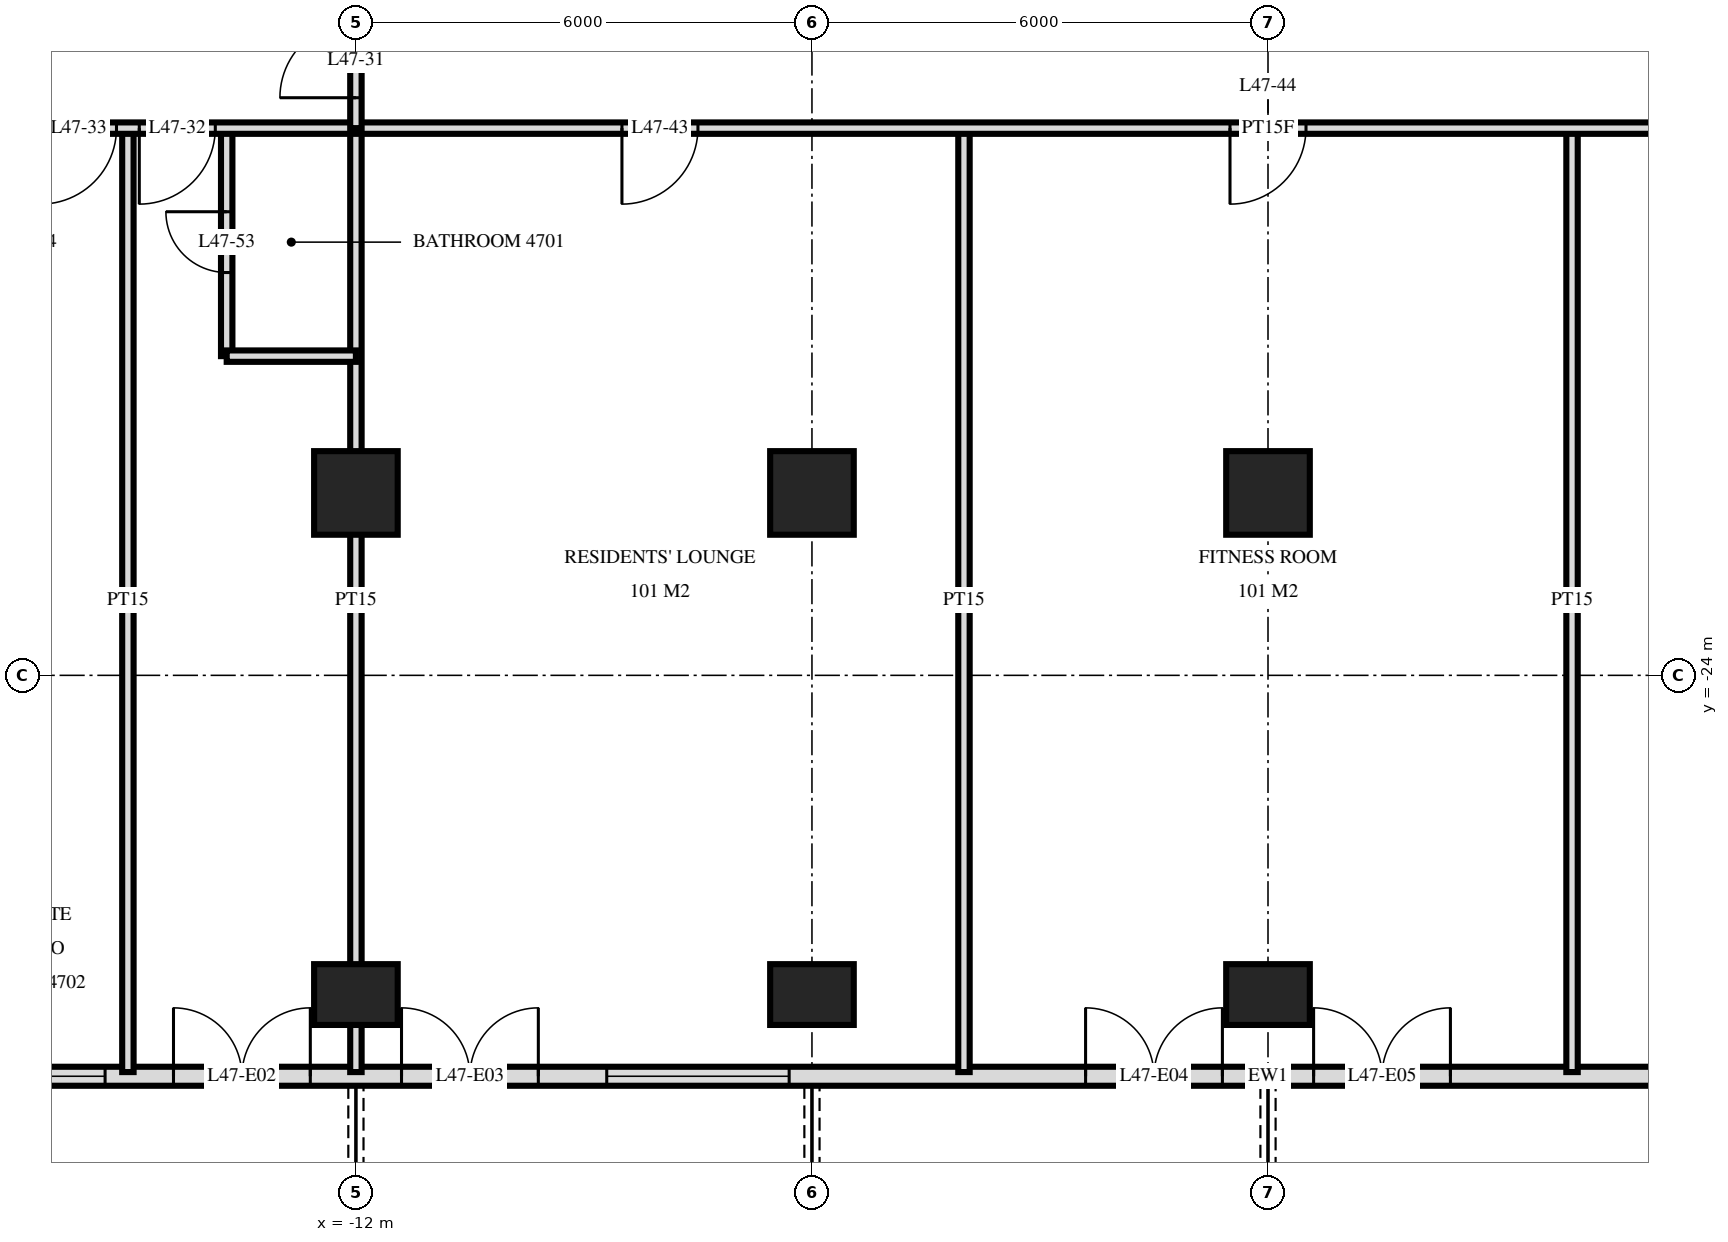
"""IFC4 building model, lengths in metres.
Left out: names, types, materials, properties, quantities, classifications, styles, units other than length and angle.
Written with IfcOpenShell. Run it as: python <this file> out.ifc"""

import sys

from ifc_helpers import new_model, si_unit, direction, frame, frame_2d, origin, origin_2d, place, context, subcontext, project, spatial, rectangle, extrude, element, fill, save


model = new_model("IFC4")
c1 = context("Model", 3, precision=1e-05, world=origin(), true_north=direction((0.0, 1.0)))
c2 = subcontext(c1, "Body", "Model", "MODEL_VIEW")
j1 = project(units=[si_unit("LENGTHUNIT", "METRE"), si_unit("PLANEANGLEUNIT", "RADIAN")], contexts=[c1])
p1 = place(None, origin())
s1 = spatial("IfcSite", under=j1, at=p1, CompositionType="ELEMENT")
p2 = place(p1, origin())
s2 = spatial("IfcBuilding", under=s1, at=p2, CompositionType="ELEMENT")
p3 = place(p2, frame((0.0, 0.0, 183.6)))
s3 = spatial("IfcBuildingStorey", under=s2, at=p3, CompositionType="ELEMENT", Elevation=183.6)
p4 = place(p3, frame((-12.0, -28.2, -0.28), z_axis=(0.0, 0.0, 1.0), x_axis=(1.0, 0.0, 0.0)))
e1 = element("IfcColumn", 1, at=p4, inside=s3, PredefinedType="COLUMN", context=c2, shape_type="SweptSolid", body=[
    extrude(rectangle(XDim=1.1, YDim=0.8, at=origin_2d()), origin(), (0.0, 0.0, 1.0), 3.78),
])
p5 = place(p3, frame((-12.0, -21.6, -0.28), z_axis=(0.0, 0.0, 1.0), x_axis=(1.0, 0.0, 0.0)))
e2 = element("IfcColumn", 2, at=p5, inside=s3, PredefinedType="COLUMN", context=c2, shape_type="SweptSolid", body=[
    extrude(rectangle(XDim=1.1, YDim=1.1, at=origin_2d()), origin(), (0.0, 0.0, 1.0), 3.78),
])
p6 = place(p3, frame((-6.0, -28.2, -0.28), z_axis=(0.0, 0.0, 1.0), x_axis=(1.0, 0.0, 0.0)))
e3 = element("IfcColumn", 3, at=p6, inside=s3, PredefinedType="COLUMN", context=c2, shape_type="SweptSolid", body=[
    extrude(rectangle(XDim=1.1, YDim=0.8, at=origin_2d()), origin(), (0.0, 0.0, 1.0), 3.78),
])
p7 = place(p3, frame((-6.0, -21.6, -0.28), z_axis=(0.0, 0.0, 1.0), x_axis=(1.0, 0.0, 0.0)))
e4 = element("IfcColumn", 4, at=p7, inside=s3, PredefinedType="COLUMN", context=c2, shape_type="SweptSolid", body=[
    extrude(rectangle(XDim=1.1, YDim=1.1, at=origin_2d()), origin(), (0.0, 0.0, 1.0), 3.78),
])
p8 = place(p3, frame((0.0, -28.2, -0.28), z_axis=(0.0, 0.0, 1.0), x_axis=(1.0, 0.0, 0.0)))
e5 = element("IfcColumn", 5, at=p8, inside=s3, PredefinedType="COLUMN", context=c2, shape_type="SweptSolid", body=[
    extrude(rectangle(XDim=1.1, YDim=0.8, at=origin_2d()), origin(), (0.0, 0.0, 1.0), 3.78),
])
p9 = place(p3, frame((0.0, -21.6, -0.28), z_axis=(0.0, 0.0, 1.0), x_axis=(1.0, 0.0, 0.0)))
e6 = element("IfcColumn", 6, at=p9, inside=s3, PredefinedType="COLUMN", context=c2, shape_type="SweptSolid", body=[
    extrude(rectangle(XDim=1.1, YDim=1.1, at=origin_2d()), origin(), (0.0, 0.0, 1.0), 3.78),
])
p10 = place(p3, frame((-22.475, -29.275, 0.0), z_axis=(0.0, 0.0, 1.0), x_axis=(1.0, 0.0, 0.0)))
e7 = element("IfcWall", 7, at=p10, inside=s3, PredefinedType="SOLIDWALL", context=c2, shape_type="SweptSolid", body=[
    extrude(rectangle(XDim=44.951, YDim=0.25, at=frame_2d((22.475, 0.0))), origin(), (0.0, 0.0, 1.0), 3.22),
])
p11 = place(p10, frame((0.575, 0.0, 0.0)))
e8 = element("IfcOpeningElement", 8, at=p11, cuts=e7, PredefinedType="OPENING", context=c2, shape_type="SweptSolid", body=[
    extrude(rectangle(XDim=1.8, YDim=2.4, at=frame_2d((0.9, 1.2))), frame((0.0, 0.135, 0.0), z_axis=(0.0, -1.0, 0.0), x_axis=(1.0, 0.0, 0.0)), (0.0, 0.0, 1.0), 0.27),
])
p12 = place(p10, frame((4.775, 0.0, 0.9)))
e9 = element("IfcOpeningElement", 9, at=p12, cuts=e7, PredefinedType="OPENING", context=c2, shape_type="SweptSolid", body=[
    extrude(rectangle(XDim=2.4, YDim=1.5, at=frame_2d((1.2, 0.75))), frame((0.0, 0.135, 0.0), z_axis=(0.0, -1.0, 0.0), x_axis=(1.0, 0.0, 0.0)), (0.0, 0.0, 1.0), 0.27),
])
p13 = place(p10, frame((8.075, 0.0, 0.0)))
e10 = element("IfcOpeningElement", 10, at=p13, cuts=e7, PredefinedType="OPENING", context=c2, shape_type="SweptSolid", body=[
    extrude(rectangle(XDim=1.8, YDim=2.4, at=frame_2d((0.9, 1.2))), frame((0.0, 0.135, 0.0), z_axis=(0.0, -1.0, 0.0), x_axis=(1.0, 0.0, 0.0)), (0.0, 0.0, 1.0), 0.27),
])
p14 = place(p10, frame((11.075, 0.0, 0.0)))
e11 = element("IfcOpeningElement", 11, at=p14, cuts=e7, PredefinedType="OPENING", context=c2, shape_type="SweptSolid", body=[
    extrude(rectangle(XDim=1.8, YDim=2.4, at=frame_2d((0.9, 1.2))), frame((0.0, 0.135, 0.0), z_axis=(0.0, -1.0, 0.0), x_axis=(1.0, 0.0, 0.0)), (0.0, 0.0, 1.0), 0.27),
])
p15 = place(p10, frame((13.775, 0.0, 0.9)))
e12 = element("IfcOpeningElement", 12, at=p15, cuts=e7, PredefinedType="OPENING", context=c2, shape_type="SweptSolid", body=[
    extrude(rectangle(XDim=2.4, YDim=1.5, at=frame_2d((1.2, 0.75))), frame((0.0, 0.135, 0.0), z_axis=(0.0, -1.0, 0.0), x_axis=(1.0, 0.0, 0.0)), (0.0, 0.0, 1.0), 0.27),
])
p16 = place(p10, frame((20.075, 0.0, 0.0)))
e13 = element("IfcOpeningElement", 13, at=p16, cuts=e7, PredefinedType="OPENING", context=c2, shape_type="SweptSolid", body=[
    extrude(rectangle(XDim=1.8, YDim=2.4, at=frame_2d((0.9, 1.2))), frame((0.0, 0.135, 0.0), z_axis=(0.0, -1.0, 0.0), x_axis=(1.0, 0.0, 0.0)), (0.0, 0.0, 1.0), 0.27),
])
p17 = place(p10, frame((23.075, 0.0, 0.0)))
e14 = element("IfcOpeningElement", 14, at=p17, cuts=e7, PredefinedType="OPENING", context=c2, shape_type="SweptSolid", body=[
    extrude(rectangle(XDim=1.8, YDim=2.4, at=frame_2d((0.9, 1.2))), frame((0.0, 0.135, 0.0), z_axis=(0.0, -1.0, 0.0), x_axis=(1.0, 0.0, 0.0)), (0.0, 0.0, 1.0), 0.27),
])
p18 = place(p10, frame((29.075, 0.0, 0.0)))
e15 = element("IfcOpeningElement", 15, at=p18, cuts=e7, PredefinedType="OPENING", context=c2, shape_type="SweptSolid", body=[
    extrude(rectangle(XDim=1.8, YDim=2.4, at=frame_2d((0.9, 1.2))), frame((0.0, 0.135, 0.0), z_axis=(0.0, -1.0, 0.0), x_axis=(1.0, 0.0, 0.0)), (0.0, 0.0, 1.0), 0.27),
])
p19 = place(p10, frame((31.775, 0.0, 0.9)))
e16 = element("IfcOpeningElement", 16, at=p19, cuts=e7, PredefinedType="OPENING", context=c2, shape_type="SweptSolid", body=[
    extrude(rectangle(XDim=2.4, YDim=1.5, at=frame_2d((1.2, 0.75))), frame((0.0, 0.135, 0.0), z_axis=(0.0, -1.0, 0.0), x_axis=(1.0, 0.0, 0.0)), (0.0, 0.0, 1.0), 0.27),
])
p20 = place(p10, frame((35.075, 0.0, 0.0)))
e17 = element("IfcOpeningElement", 17, at=p20, cuts=e7, PredefinedType="OPENING", context=c2, shape_type="SweptSolid", body=[
    extrude(rectangle(XDim=1.8, YDim=2.4, at=frame_2d((0.9, 1.2))), frame((0.0, 0.135, 0.0), z_axis=(0.0, -1.0, 0.0), x_axis=(1.0, 0.0, 0.0)), (0.0, 0.0, 1.0), 0.27),
])
p21 = place(p10, frame((37.775, 0.0, 0.9)))
e18 = element("IfcOpeningElement", 18, at=p21, cuts=e7, PredefinedType="OPENING", context=c2, shape_type="SweptSolid", body=[
    extrude(rectangle(XDim=2.4, YDim=1.5, at=frame_2d((1.2, 0.75))), frame((0.0, 0.135, 0.0), z_axis=(0.0, -1.0, 0.0), x_axis=(1.0, 0.0, 0.0)), (0.0, 0.0, 1.0), 0.27),
])
p22 = place(p10, frame((41.075, 0.0, 0.0)))
e19 = element("IfcOpeningElement", 19, at=p22, cuts=e7, PredefinedType="OPENING", context=c2, shape_type="SweptSolid", body=[
    extrude(rectangle(XDim=1.8, YDim=2.4, at=frame_2d((0.9, 1.2))), frame((0.0, 0.135, 0.0), z_axis=(0.0, -1.0, 0.0), x_axis=(1.0, 0.0, 0.0)), (0.0, 0.0, 1.0), 0.27),
])
for number, where, z_axis, x_axis in (
    (20, (4.0, -29.22, 0.0), (0.0, 0.0, 1.0), (0.0, 1.0, 0.0)),
    (21, (-4.0, -29.22, 0.0), (0.0, 0.0, 1.0), (0.0, 1.0, 0.0)),
):
    element("IfcWall", number, at=place(p3, frame(where, z_axis=z_axis, x_axis=x_axis)), inside=s3, PredefinedType="PARTITIONING", context=c2, shape_type="SweptSolid", body=[
        extrude(rectangle(XDim=12.42, YDim=0.15, at=frame_2d((6.21, 0.0))), origin(), (0.0, 0.0, 1.0), 3.22),
    ])
p23 = place(p3, frame((-12.0, -16.8, 0.0), z_axis=(0.0, 0.0, 1.0), x_axis=(0.0, 1.0, 0.0)))
e22 = element("IfcWall", 22, at=p23, inside=s3, PredefinedType="PARTITIONING", context=c2, shape_type="SweptSolid", body=[
    extrude(rectangle(XDim=1.75, YDim=0.15, at=frame_2d((0.875, 0.0))), origin(), (0.0, 0.0, 1.0), 3.22),
])
p24 = place(p23, frame((0.4, 0.0, 0.0)))
e23 = element("IfcOpeningElement", 23, at=p24, cuts=e22, PredefinedType="OPENING", context=c2, shape_type="SweptSolid", body=[
    extrude(rectangle(XDim=1.0, YDim=2.1, at=frame_2d((0.5, 1.05))), frame((0.0, 0.085, 0.0), z_axis=(0.0, -1.0, 0.0), x_axis=(1.0, 0.0, 0.0)), (0.0, 0.0, 1.0), 0.17),
])
p25 = place(p3, frame((-12.0, -29.22, 0.0), z_axis=(0.0, 0.0, 1.0), x_axis=(0.0, 1.0, 0.0)))
e24 = element("IfcWall", 24, at=p25, inside=s3, PredefinedType="PARTITIONING", context=c2, shape_type="SweptSolid", body=[
    extrude(rectangle(XDim=12.42, YDim=0.15, at=frame_2d((6.21, 0.0))), origin(), (0.0, 0.0, 1.0), 3.22),
])
p26 = place(p3, frame((-13.7, -19.8, 0.0), z_axis=(0.0, 0.0, 1.0), x_axis=(0.0, 1.0, 0.0)))
e25 = element("IfcWall", 25, at=p26, inside=s3, PredefinedType="PARTITIONING", context=c2, shape_type="SweptSolid", body=[
    extrude(rectangle(XDim=3.0, YDim=0.15, at=frame_2d((1.5, 0.0))), origin(), (0.0, 0.0, 1.0), 3.22),
])
p27 = place(p26, frame((1.1, 0.0, 0.0)))
e26 = element("IfcOpeningElement", 26, at=p27, cuts=e25, PredefinedType="OPENING", context=c2, shape_type="SweptSolid", body=[
    extrude(rectangle(XDim=0.8, YDim=2.1, at=frame_2d((0.4, 1.05))), frame((0.0, 0.085, 0.0), z_axis=(0.0, -1.0, 0.0), x_axis=(1.0, 0.0, 0.0)), (0.0, 0.0, 1.0), 0.17),
])
p28 = place(p3, frame((-15.0, -29.22, 0.0), z_axis=(0.0, 0.0, 1.0), x_axis=(0.0, 1.0, 0.0)))
e27 = element("IfcWall", 27, at=p28, inside=s3, PredefinedType="PARTITIONING", context=c2, shape_type="SweptSolid", body=[
    extrude(rectangle(XDim=12.42, YDim=0.15, at=frame_2d((6.21, 0.0))), origin(), (0.0, 0.0, 1.0), 3.22),
])
p29 = place(p3, frame((-13.7, -19.8, 0.0), z_axis=(0.0, 0.0, 1.0), x_axis=(1.0, 0.0, 0.0)))
e28 = element("IfcWall", 28, at=p29, inside=s3, PredefinedType="PARTITIONING", context=c2, shape_type="SweptSolid", body=[
    extrude(rectangle(XDim=1.7, YDim=0.15, at=frame_2d((0.85, 0.0))), origin(), (0.0, 0.0, 1.0), 3.22),
])
p30 = place(p3, frame((-26.82, -16.8, 0.0), z_axis=(0.0, 0.0, 1.0), x_axis=(1.0, 0.0, 0.0)))
e29 = element("IfcWall", 29, at=p30, inside=s3, PredefinedType="PARTITIONING", context=c2, shape_type="SweptSolid", body=[
    extrude(rectangle(XDim=53.64, YDim=0.15, at=frame_2d((26.82, 0.0))), origin(), (0.0, 0.0, 1.0), 3.22),
])
p31 = place(p30, frame((11.97, 0.0, 0.0)))
e30 = element("IfcOpeningElement", 30, at=p31, cuts=e29, PredefinedType="OPENING", context=c2, shape_type="SweptSolid", body=[
    extrude(rectangle(XDim=1.0, YDim=2.1, at=frame_2d((0.5, 1.05))), frame((0.0, 0.085, 0.0), z_axis=(0.0, -1.0, 0.0), x_axis=(1.0, 0.0, 0.0)), (0.0, 0.0, 1.0), 0.17),
])
p32 = place(p30, frame((10.67, 0.0, 0.0)))
e31 = element("IfcOpeningElement", 31, at=p32, cuts=e29, PredefinedType="OPENING", context=c2, shape_type="SweptSolid", body=[
    extrude(rectangle(XDim=1.0, YDim=2.1, at=frame_2d((0.5, 1.05))), frame((0.0, 0.085, 0.0), z_axis=(0.0, -1.0, 0.0), x_axis=(1.0, 0.0, 0.0)), (0.0, 0.0, 1.0), 0.17),
])
p33 = place(p30, frame((3.22, 0.0, 0.0)))
e32 = element("IfcOpeningElement", 32, at=p33, cuts=e29, PredefinedType="OPENING", context=c2, shape_type="SweptSolid", body=[
    extrude(rectangle(XDim=1.0, YDim=2.1, at=frame_2d((0.5, 1.05))), frame((0.0, 0.085, 0.0), z_axis=(0.0, -1.0, 0.0), x_axis=(1.0, 0.0, 0.0)), (0.0, 0.0, 1.0), 0.17),
])
p34 = place(p30, frame((5.02, 0.0, 0.0)))
e33 = element("IfcOpeningElement", 33, at=p34, cuts=e29, PredefinedType="OPENING", context=c2, shape_type="SweptSolid", body=[
    extrude(rectangle(XDim=1.0, YDim=2.1, at=frame_2d((0.5, 1.05))), frame((0.0, 0.085, 0.0), z_axis=(0.0, -1.0, 0.0), x_axis=(1.0, 0.0, 0.0)), (0.0, 0.0, 1.0), 0.17),
])
p35 = place(p30, frame((38.97, 0.0, 0.0)))
e34 = element("IfcOpeningElement", 34, at=p35, cuts=e29, PredefinedType="OPENING", context=c2, shape_type="SweptSolid", body=[
    extrude(rectangle(XDim=1.0, YDim=2.1, at=frame_2d((0.5, 1.05))), frame((0.0, 0.085, 0.0), z_axis=(0.0, -1.0, 0.0), x_axis=(1.0, 0.0, 0.0)), (0.0, 0.0, 1.0), 0.17),
])
p36 = place(p30, frame((48.72, 0.0, 0.0)))
e35 = element("IfcOpeningElement", 35, at=p36, cuts=e29, PredefinedType="OPENING", context=c2, shape_type="SweptSolid", body=[
    extrude(rectangle(XDim=1.0, YDim=2.1, at=frame_2d((0.5, 1.05))), frame((0.0, 0.085, 0.0), z_axis=(0.0, -1.0, 0.0), x_axis=(1.0, 0.0, 0.0)), (0.0, 0.0, 1.0), 0.17),
])
p37 = place(p30, frame((46.92, 0.0, 0.0)))
e36 = element("IfcOpeningElement", 36, at=p37, cuts=e29, PredefinedType="OPENING", context=c2, shape_type="SweptSolid", body=[
    extrude(rectangle(XDim=1.0, YDim=2.1, at=frame_2d((0.5, 1.05))), frame((0.0, 0.085, 0.0), z_axis=(0.0, -1.0, 0.0), x_axis=(1.0, 0.0, 0.0)), (0.0, 0.0, 1.0), 0.17),
])
p38 = place(p30, frame((18.32, 0.0, 0.0)))
e37 = element("IfcOpeningElement", 37, at=p38, cuts=e29, PredefinedType="OPENING", context=c2, shape_type="SweptSolid", body=[
    extrude(rectangle(XDim=1.0, YDim=2.1, at=frame_2d((0.5, 1.05))), frame((0.0, 0.085, 0.0), z_axis=(0.0, -1.0, 0.0), x_axis=(1.0, 0.0, 0.0)), (0.0, 0.0, 1.0), 0.17),
])
p39 = place(p30, frame((26.32, 0.0, 0.0)))
e38 = element("IfcOpeningElement", 38, at=p39, cuts=e29, PredefinedType="OPENING", context=c2, shape_type="SweptSolid", body=[
    extrude(rectangle(XDim=1.0, YDim=2.1, at=frame_2d((0.5, 1.05))), frame((0.0, 0.085, 0.0), z_axis=(0.0, -1.0, 0.0), x_axis=(1.0, 0.0, 0.0)), (0.0, 0.0, 1.0), 0.17),
])
p40 = place(p30, frame((34.32, 0.0, 0.0)))
e39 = element("IfcOpeningElement", 39, at=p40, cuts=e29, PredefinedType="OPENING", context=c2, shape_type="SweptSolid", body=[
    extrude(rectangle(XDim=1.0, YDim=2.1, at=frame_2d((0.5, 1.05))), frame((0.0, 0.085, 0.0), z_axis=(0.0, -1.0, 0.0), x_axis=(1.0, 0.0, 0.0)), (0.0, 0.0, 1.0), 0.17),
])
p41 = place(p12, origin())
e40 = element("IfcWindow", 40, at=p41, inside=s3, PartitioningType="SINGLE_PANEL", PredefinedType="WINDOW", context=c2, shape_type="SweptSolid", body=[
    extrude(rectangle(XDim=2.4, YDim=1.5, at=frame_2d((1.2, 0.75))), frame((0.0, 0.03, 0.0), z_axis=(0.0, -1.0, 0.0), x_axis=(1.0, 0.0, 0.0)), (0.0, 0.0, 1.0), 0.06),
])
fill(e9, e40)
p42 = place(p13, origin())
e41 = element("IfcDoor", 41, at=p42, inside=s3, OperationType="DOUBLE_DOOR_SINGLE_SWING", PredefinedType="DOOR", context=c2, shape_type="SweptSolid", body=[
    extrude(rectangle(XDim=1.8, YDim=2.4, at=frame_2d((0.9, 1.2))), frame((0.0, 0.025, 0.0), z_axis=(0.0, -1.0, 0.0), x_axis=(1.0, 0.0, 0.0)), (0.0, 0.0, 1.0), 0.05),
])
fill(e10, e41)
p43 = place(p14, origin())
e42 = element("IfcDoor", 42, at=p43, inside=s3, OperationType="DOUBLE_DOOR_SINGLE_SWING", PredefinedType="DOOR", context=c2, shape_type="SweptSolid", body=[
    extrude(rectangle(XDim=1.8, YDim=2.4, at=frame_2d((0.9, 1.2))), frame((0.0, 0.025, 0.0), z_axis=(0.0, -1.0, 0.0), x_axis=(1.0, 0.0, 0.0)), (0.0, 0.0, 1.0), 0.05),
])
fill(e11, e42)
p44 = place(p15, origin())
e43 = element("IfcWindow", 43, at=p44, inside=s3, PartitioningType="SINGLE_PANEL", PredefinedType="WINDOW", context=c2, shape_type="SweptSolid", body=[
    extrude(rectangle(XDim=2.4, YDim=1.5, at=frame_2d((1.2, 0.75))), frame((0.0, 0.03, 0.0), z_axis=(0.0, -1.0, 0.0), x_axis=(1.0, 0.0, 0.0)), (0.0, 0.0, 1.0), 0.06),
])
fill(e12, e43)
p45 = place(p16, origin())
e44 = element("IfcDoor", 44, at=p45, inside=s3, OperationType="DOUBLE_DOOR_SINGLE_SWING", PredefinedType="DOOR", context=c2, shape_type="SweptSolid", body=[
    extrude(rectangle(XDim=1.8, YDim=2.4, at=frame_2d((0.9, 1.2))), frame((0.0, 0.025, 0.0), z_axis=(0.0, -1.0, 0.0), x_axis=(1.0, 0.0, 0.0)), (0.0, 0.0, 1.0), 0.05),
])
fill(e13, e44)
p46 = place(p17, origin())
e45 = element("IfcDoor", 45, at=p46, inside=s3, OperationType="DOUBLE_DOOR_SINGLE_SWING", PredefinedType="DOOR", context=c2, shape_type="SweptSolid", body=[
    extrude(rectangle(XDim=1.8, YDim=2.4, at=frame_2d((0.9, 1.2))), frame((0.0, 0.025, 0.0), z_axis=(0.0, -1.0, 0.0), x_axis=(1.0, 0.0, 0.0)), (0.0, 0.0, 1.0), 0.05),
])
fill(e14, e45)
p47 = place(p24, origin())
e46 = element("IfcDoor", 46, at=p47, inside=s3, OperationType="SINGLE_SWING_RIGHT", PredefinedType="DOOR", context=c2, shape_type="SweptSolid", body=[
    extrude(rectangle(XDim=1.0, YDim=2.1, at=frame_2d((0.5, 1.05))), frame((0.0, 0.025, 0.0), z_axis=(0.0, -1.0, 0.0), x_axis=(1.0, 0.0, 0.0)), (0.0, 0.0, 1.0), 0.05),
])
fill(e23, e46)
p48 = place(p31, frame((0.5, 0.0, 0.0), z_axis=(0.0, 0.0, 1.0), x_axis=(-1.0, 0.0, 0.0)))
e47 = element("IfcDoor", 47, at=p48, inside=s3, OperationType="SINGLE_SWING_LEFT", PredefinedType="DOOR", context=c2, shape_type="SweptSolid", body=[
    extrude(rectangle(XDim=1.0, YDim=2.1, at=frame_2d((0.0, 1.05))), frame((0.0, -0.025, 0.0), z_axis=(0.0, 1.0, 0.0), x_axis=(-1.0, 0.0, 0.0)), (0.0, 0.0, 1.0), 0.05),
])
fill(e30, e47)
p49 = place(p32, frame((0.5, 0.0, 0.0), z_axis=(0.0, 0.0, 1.0), x_axis=(-1.0, 0.0, 0.0)))
e48 = element("IfcDoor", 48, at=p49, inside=s3, OperationType="SINGLE_SWING_LEFT", PredefinedType="DOOR", context=c2, shape_type="SweptSolid", body=[
    extrude(rectangle(XDim=1.0, YDim=2.1, at=frame_2d((0.0, 1.05))), frame((0.0, -0.025, 0.0), z_axis=(0.0, 1.0, 0.0), x_axis=(-1.0, 0.0, 0.0)), (0.0, 0.0, 1.0), 0.05),
])
fill(e31, e48)
p50 = place(p38, frame((0.5, 0.0, 0.0), z_axis=(0.0, 0.0, 1.0), x_axis=(-1.0, 0.0, 0.0)))
e49 = element("IfcDoor", 49, at=p50, inside=s3, OperationType="SINGLE_SWING_LEFT", PredefinedType="DOOR", context=c2, shape_type="SweptSolid", body=[
    extrude(rectangle(XDim=1.0, YDim=2.1, at=frame_2d((0.0, 1.05))), frame((0.0, -0.025, 0.0), z_axis=(0.0, 1.0, 0.0), x_axis=(-1.0, 0.0, 0.0)), (0.0, 0.0, 1.0), 0.05),
])
fill(e37, e49)
p51 = place(p39, frame((0.5, 0.0, 0.0), z_axis=(0.0, 0.0, 1.0), x_axis=(-1.0, 0.0, 0.0)))
e50 = element("IfcDoor", 50, at=p51, inside=s3, OperationType="SINGLE_SWING_LEFT", PredefinedType="DOOR", context=c2, shape_type="SweptSolid", body=[
    extrude(rectangle(XDim=1.0, YDim=2.1, at=frame_2d((0.0, 1.05))), frame((0.0, -0.025, 0.0), z_axis=(0.0, 1.0, 0.0), x_axis=(-1.0, 0.0, 0.0)), (0.0, 0.0, 1.0), 0.05),
])
fill(e38, e50)
p52 = place(p27, origin())
e51 = element("IfcDoor", 51, at=p52, inside=s3, OperationType="SINGLE_SWING_LEFT", PredefinedType="DOOR", context=c2, shape_type="SweptSolid", body=[
    extrude(rectangle(XDim=0.8, YDim=2.1, at=frame_2d((0.4, 1.05))), frame((0.0, 0.025, 0.0), z_axis=(0.0, -1.0, 0.0), x_axis=(1.0, 0.0, 0.0)), (0.0, 0.0, 1.0), 0.05),
])
fill(e26, e51)
save(model, sys.argv[1])
